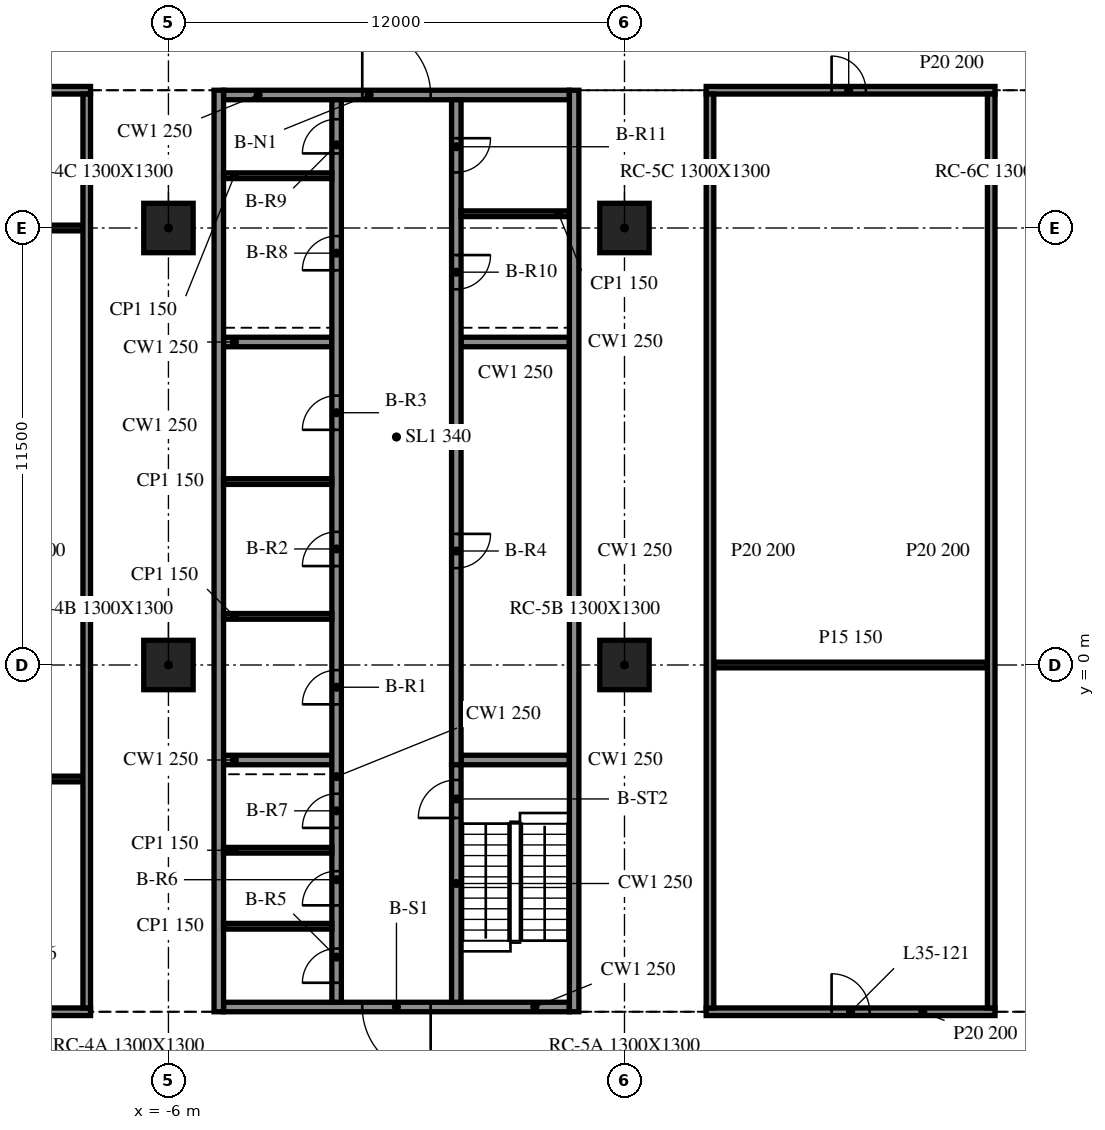
"""IFC4 building model, lengths in metres.
Left out: names, types, materials, properties, quantities, classifications, styles, units other than length and angle.
Written with IfcOpenShell. Run it as: python <this file> out.ifc"""

import sys

from ifc_helpers import new_model, si_unit, direction, frame, frame_2d, origin, origin_2d, place, context, subcontext, project, spatial, rectangle, extrude, element, fill, save


model = new_model("IFC4")
c1 = context("Model", 3, precision=1e-05, world=origin(), true_north=direction((0.0, 1.0)))
c2 = subcontext(c1, "Body", "Model", "MODEL_VIEW")
j1 = project(units=[si_unit("LENGTHUNIT", "METRE"), si_unit("PLANEANGLEUNIT", "RADIAN")], contexts=[c1])
p1 = place(None, origin())
s1 = spatial("IfcSite", under=j1, at=p1, CompositionType="ELEMENT")
p2 = place(p1, origin())
s2 = spatial("IfcBuilding", under=s1, at=p2, CompositionType="ELEMENT")
p3 = place(p2, frame((0.0, 0.0, 150.7)))
s3 = spatial("IfcBuildingStorey", under=s2, at=p3, CompositionType="ELEMENT", Elevation=150.7)
for number, where, z_axis, x_axis in (
    (1, (-6.0, 0.0, -0.34), (0.0, 0.0, 1.0), (1.0, 0.0, 0.0)),
    (2, (-6.0, 11.5, -0.34), (0.0, 0.0, 1.0), (1.0, 0.0, 0.0)),
    (3, (6.0, 0.0, -0.34), (0.0, 0.0, 1.0), (1.0, 0.0, 0.0)),
    (4, (6.0, 11.5, -0.34), (0.0, 0.0, 1.0), (1.0, 0.0, 0.0)),
):
    element("IfcColumn", number, at=place(p3, frame(where, z_axis=z_axis, x_axis=x_axis)), inside=s3, PredefinedType="COLUMN", context=c2, shape_type="SweptSolid", body=[
        extrude(rectangle(XDim=1.3, YDim=1.3, at=origin_2d()), origin(), (0.0, 0.0, 1.0), 3.89),
    ])
for number, where, z_axis, x_axis in (
    (5, (-4.675, 15.125, 0.0), (0.0, 0.0, 1.0), (0.0, -1.0, 0.0)),
    (6, (4.675, -9.125, 0.0), (0.0, 0.0, 1.0), (0.0, 1.0, 0.0)),
):
    element("IfcWall", number, at=place(p3, frame(where, z_axis=z_axis, x_axis=x_axis)), inside=s3, PredefinedType="SOLIDWALL", context=c2, shape_type="SweptSolid", body=[
        extrude(rectangle(XDim=24.25, YDim=0.25, at=frame_2d((12.125, 0.0))), origin(), (0.0, 0.0, 1.0), 3.55),
    ])
p4 = place(p3, frame((4.55, -9.0, 0.0), z_axis=(0.0, 0.0, 1.0), x_axis=(-1.0, 0.0, 0.0)))
e7 = element("IfcWall", 7, at=p4, inside=s3, PredefinedType="SOLIDWALL", context=c2, shape_type="SweptSolid", body=[
    extrude(rectangle(XDim=9.1, YDim=0.25, at=frame_2d((4.55, 0.0))), origin(), (0.0, 0.0, 1.0), 3.55),
])
p5 = place(p4, frame((3.65, 0.0, 0.0)))
e8 = element("IfcOpeningElement", 8, at=p5, cuts=e7, PredefinedType="OPENING", context=c2, shape_type="SweptSolid", body=[
    extrude(rectangle(XDim=1.8, YDim=2.1, at=frame_2d((0.9, 1.05))), frame((0.0, 0.135, 0.0), z_axis=(0.0, -1.0, 0.0), x_axis=(1.0, 0.0, 0.0)), (0.0, 0.0, 1.0), 0.27),
])
p6 = place(p3, frame((-4.55, 15.0, 0.0), z_axis=(0.0, 0.0, 1.0), x_axis=(1.0, 0.0, 0.0)))
e9 = element("IfcWall", 9, at=p6, inside=s3, PredefinedType="SOLIDWALL", context=c2, shape_type="SweptSolid", body=[
    extrude(rectangle(XDim=9.1, YDim=0.25, at=frame_2d((4.55, 0.0))), origin(), (0.0, 0.0, 1.0), 3.55),
])
p7 = place(p6, frame((3.65, 0.0, 0.0)))
e10 = element("IfcOpeningElement", 10, at=p7, cuts=e9, PredefinedType="OPENING", context=c2, shape_type="SweptSolid", body=[
    extrude(rectangle(XDim=1.8, YDim=2.1, at=frame_2d((0.9, 1.05))), frame((0.0, 0.135, 0.0), z_axis=(0.0, -1.0, 0.0), x_axis=(1.0, 0.0, 0.0)), (0.0, 0.0, 1.0), 0.27),
])
p8 = place(p3, frame((-1.575, -8.875, 0.0), z_axis=(0.0, 0.0, 1.0), x_axis=(0.0, 1.0, 0.0)))
e11 = element("IfcWall", 11, at=p8, inside=s3, PredefinedType="SOLIDWALL", context=c2, shape_type="SweptSolid", body=[
    extrude(rectangle(XDim=23.75, YDim=0.25, at=frame_2d((11.875, 0.0))), origin(), (0.0, 0.0, 1.0), 3.55),
])
p9 = place(p8, frame((7.84, 0.0, 0.0)))
e12 = element("IfcOpeningElement", 12, at=p9, cuts=e11, PredefinedType="OPENING", context=c2, shape_type="SweptSolid", body=[
    extrude(rectangle(XDim=0.9, YDim=2.1, at=frame_2d((0.45, 1.05))), frame((0.0, 0.135, 0.0), z_axis=(0.0, -1.0, 0.0), x_axis=(1.0, 0.0, 0.0)), (0.0, 0.0, 1.0), 0.27),
])
p10 = place(p8, frame((11.479, 0.0, 0.0)))
e13 = element("IfcOpeningElement", 13, at=p10, cuts=e11, PredefinedType="OPENING", context=c2, shape_type="SweptSolid", body=[
    extrude(rectangle(XDim=0.9, YDim=2.1, at=frame_2d((0.45, 1.05))), frame((0.0, 0.135, 0.0), z_axis=(0.0, -1.0, 0.0), x_axis=(1.0, 0.0, 0.0)), (0.0, 0.0, 1.0), 0.27),
])
p11 = place(p8, frame((15.064, 0.0, 0.0)))
e14 = element("IfcOpeningElement", 14, at=p11, cuts=e11, PredefinedType="OPENING", context=c2, shape_type="SweptSolid", body=[
    extrude(rectangle(XDim=0.9, YDim=2.1, at=frame_2d((0.45, 1.05))), frame((0.0, 0.135, 0.0), z_axis=(0.0, -1.0, 0.0), x_axis=(1.0, 0.0, 0.0)), (0.0, 0.0, 1.0), 0.27),
])
p12 = place(p8, frame((0.512, 0.0, 0.0)))
e15 = element("IfcOpeningElement", 15, at=p12, cuts=e11, PredefinedType="OPENING", context=c2, shape_type="SweptSolid", body=[
    extrude(rectangle(XDim=0.9, YDim=2.1, at=frame_2d((0.45, 1.05))), frame((0.0, 0.135, 0.0), z_axis=(0.0, -1.0, 0.0), x_axis=(1.0, 0.0, 0.0)), (0.0, 0.0, 1.0), 0.27),
])
p13 = place(p8, frame((2.55, 0.0, 0.0)))
e16 = element("IfcOpeningElement", 16, at=p13, cuts=e11, PredefinedType="OPENING", context=c2, shape_type="SweptSolid", body=[
    extrude(rectangle(XDim=0.9, YDim=2.1, at=frame_2d((0.45, 1.05))), frame((0.0, 0.135, 0.0), z_axis=(0.0, -1.0, 0.0), x_axis=(1.0, 0.0, 0.0)), (0.0, 0.0, 1.0), 0.27),
])
p14 = place(p8, frame((4.587, 0.0, 0.0)))
e17 = element("IfcOpeningElement", 17, at=p14, cuts=e11, PredefinedType="OPENING", context=c2, shape_type="SweptSolid", body=[
    extrude(rectangle(XDim=0.9, YDim=2.1, at=frame_2d((0.45, 1.05))), frame((0.0, 0.135, 0.0), z_axis=(0.0, -1.0, 0.0), x_axis=(1.0, 0.0, 0.0)), (0.0, 0.0, 1.0), 0.27),
])
p15 = place(p8, frame((19.262, 0.0, 0.0)))
e18 = element("IfcOpeningElement", 18, at=p15, cuts=e11, PredefinedType="OPENING", context=c2, shape_type="SweptSolid", body=[
    extrude(rectangle(XDim=0.9, YDim=2.1, at=frame_2d((0.45, 1.05))), frame((0.0, 0.135, 0.0), z_axis=(0.0, -1.0, 0.0), x_axis=(1.0, 0.0, 0.0)), (0.0, 0.0, 1.0), 0.27),
])
p16 = place(p8, frame((22.337, 0.0, 0.0)))
e19 = element("IfcOpeningElement", 19, at=p16, cuts=e11, PredefinedType="OPENING", context=c2, shape_type="SweptSolid", body=[
    extrude(rectangle(XDim=0.9, YDim=2.1, at=frame_2d((0.45, 1.05))), frame((0.0, 0.135, 0.0), z_axis=(0.0, -1.0, 0.0), x_axis=(1.0, 0.0, 0.0)), (0.0, 0.0, 1.0), 0.27),
])
p17 = place(p3, frame((1.575, -8.875, 0.0), z_axis=(0.0, 0.0, 1.0), x_axis=(0.0, 1.0, 0.0)))
e20 = element("IfcWall", 20, at=p17, inside=s3, PredefinedType="SOLIDWALL", context=c2, shape_type="SweptSolid", body=[
    extrude(rectangle(XDim=6.25, YDim=0.25, at=frame_2d((3.125, 0.0))), origin(), (0.0, 0.0, 1.0), 3.55),
])
p18 = place(p17, frame((4.85, 0.0, 0.0)))
e21 = element("IfcOpeningElement", 21, at=p18, cuts=e20, PredefinedType="OPENING", context=c2, shape_type="SweptSolid", body=[
    extrude(rectangle(XDim=1.0, YDim=2.1, at=frame_2d((0.5, 1.05))), frame((0.0, 0.135, 0.0), z_axis=(0.0, -1.0, 0.0), x_axis=(1.0, 0.0, 0.0)), (0.0, 0.0, 1.0), 0.27),
])
p19 = place(p3, frame((1.575, 14.875, 0.0), z_axis=(0.0, 0.0, 1.0), x_axis=(0.0, -1.0, 0.0)))
e22 = element("IfcWall", 22, at=p19, inside=s3, PredefinedType="SOLIDWALL", context=c2, shape_type="SweptSolid", body=[
    extrude(rectangle(XDim=17.5, YDim=0.25, at=frame_2d((8.75, 0.0))), origin(), (0.0, 0.0, 1.0), 3.55),
])
p20 = place(p19, frame((11.425, 0.0, 0.0)))
e23 = element("IfcOpeningElement", 23, at=p20, cuts=e22, PredefinedType="OPENING", context=c2, shape_type="SweptSolid", body=[
    extrude(rectangle(XDim=0.9, YDim=2.1, at=frame_2d((0.45, 1.05))), frame((0.0, 0.135, 0.0), z_axis=(0.0, -1.0, 0.0), x_axis=(1.0, 0.0, 0.0)), (0.0, 0.0, 1.0), 0.27),
])
p21 = place(p19, frame((4.087, 0.0, 0.0)))
e24 = element("IfcOpeningElement", 24, at=p21, cuts=e22, PredefinedType="OPENING", context=c2, shape_type="SweptSolid", body=[
    extrude(rectangle(XDim=0.9, YDim=2.1, at=frame_2d((0.45, 1.05))), frame((0.0, 0.135, 0.0), z_axis=(0.0, -1.0, 0.0), x_axis=(1.0, 0.0, 0.0)), (0.0, 0.0, 1.0), 0.27),
])
p22 = place(p19, frame((1.012, 0.0, 0.0)))
e25 = element("IfcOpeningElement", 25, at=p22, cuts=e22, PredefinedType="OPENING", context=c2, shape_type="SweptSolid", body=[
    extrude(rectangle(XDim=0.9, YDim=2.1, at=frame_2d((0.45, 1.05))), frame((0.0, 0.135, 0.0), z_axis=(0.0, -1.0, 0.0), x_axis=(1.0, 0.0, 0.0)), (0.0, 0.0, 1.0), 0.27),
])
for number, where, z_axis, x_axis in (
    (26, (-4.55, -2.5, 0.0), (0.0, 0.0, 1.0), (1.0, 0.0, 0.0)),
    (27, (-4.55, 8.5, 0.0), (0.0, 0.0, 1.0), (1.0, 0.0, 0.0)),
    (28, (1.7, -2.5, 0.0), (0.0, 0.0, 1.0), (1.0, 0.0, 0.0)),
    (29, (1.7, 8.5, 0.0), (0.0, 0.0, 1.0), (1.0, 0.0, 0.0)),
):
    element("IfcWall", number, at=place(p3, frame(where, z_axis=z_axis, x_axis=x_axis)), inside=s3, PredefinedType="SOLIDWALL", context=c2, shape_type="SweptSolid", body=[
        extrude(rectangle(XDim=2.85, YDim=0.25, at=frame_2d((1.425, 0.0))), origin(), (0.0, 0.0, 1.0), 3.55),
    ])
for number, where, z_axis, x_axis in (
    (30, (-4.55, 1.28, 0.0), (0.0, 0.0, 1.0), (1.0, 0.0, 0.0)),
    (31, (-4.55, 4.827, 0.0), (0.0, 0.0, 1.0), (1.0, 0.0, 0.0)),
    (32, (-4.55, -6.875, 0.0), (0.0, 0.0, 1.0), (1.0, 0.0, 0.0)),
    (33, (-4.55, -4.875, 0.0), (0.0, 0.0, 1.0), (1.0, 0.0, 0.0)),
    (34, (-4.55, 12.875, 0.0), (0.0, 0.0, 1.0), (1.0, 0.0, 0.0)),
    (35, (1.7, 11.875, 0.0), (0.0, 0.0, 1.0), (1.0, 0.0, 0.0)),
):
    element("IfcWall", number, at=place(p3, frame(where, z_axis=z_axis, x_axis=x_axis)), inside=s3, PredefinedType="PARTITIONING", context=c2, shape_type="SweptSolid", body=[
        extrude(rectangle(XDim=2.85, YDim=0.15, at=frame_2d((1.425, 0.0))), origin(), (0.0, 0.0, 1.0), 3.55),
    ])
p23 = place(p3, frame((-16.05, -9.125, 0.0), z_axis=(0.0, 0.0, 1.0), x_axis=(1.0, 0.0, 0.0)))
e36 = element("IfcWall", 36, at=p23, inside=s3, PredefinedType="PARTITIONING", context=c2, shape_type="SweptSolid", body=[
    extrude(rectangle(XDim=8.0, YDim=0.2, at=frame_2d((4.0, 0.0))), origin(), (0.0, 0.0, 1.0), 3.55),
])
p24 = place(p23, frame((3.5, 0.0, 0.0)))
e37 = element("IfcOpeningElement", 37, at=p24, cuts=e36, PredefinedType="OPENING", context=c2, shape_type="SweptSolid", body=[
    extrude(rectangle(XDim=1.0, YDim=2.1, at=frame_2d((0.5, 1.05))), frame((0.0, 0.11, 0.0), z_axis=(0.0, -1.0, 0.0), x_axis=(1.0, 0.0, 0.0)), (0.0, 0.0, 1.0), 0.22),
])
p25 = place(p3, frame((8.15, -9.125, 0.0), z_axis=(0.0, 0.0, 1.0), x_axis=(1.0, 0.0, 0.0)))
e38 = element("IfcWall", 38, at=p25, inside=s3, PredefinedType="PARTITIONING", context=c2, shape_type="SweptSolid", body=[
    extrude(rectangle(XDim=7.6, YDim=0.2, at=frame_2d((3.8, 0.0))), origin(), (0.0, 0.0, 1.0), 3.55),
])
p26 = place(p25, frame((3.3, 0.0, 0.0)))
e39 = element("IfcOpeningElement", 39, at=p26, cuts=e38, PredefinedType="OPENING", context=c2, shape_type="SweptSolid", body=[
    extrude(rectangle(XDim=1.0, YDim=2.1, at=frame_2d((0.5, 1.05))), frame((0.0, 0.11, 0.0), z_axis=(0.0, -1.0, 0.0), x_axis=(1.0, 0.0, 0.0)), (0.0, 0.0, 1.0), 0.22),
])
p27 = place(p3, frame((-15.85, -3.0, 0.0), z_axis=(0.0, 0.0, 1.0), x_axis=(1.0, 0.0, 0.0)))
e40 = element("IfcWall", 40, at=p27, inside=s3, PredefinedType="PARTITIONING", context=c2, shape_type="SweptSolid", body=[
    extrude(rectangle(XDim=7.6, YDim=0.15, at=frame_2d((3.8, 0.0))), origin(), (0.0, 0.0, 1.0), 3.55),
])
p28 = place(p3, frame((8.35, 0.0, 0.0), z_axis=(0.0, 0.0, 1.0), x_axis=(1.0, 0.0, 0.0)))
e41 = element("IfcWall", 41, at=p28, inside=s3, PredefinedType="PARTITIONING", context=c2, shape_type="SweptSolid", body=[
    extrude(rectangle(XDim=7.2, YDim=0.15, at=frame_2d((3.6, 0.0))), origin(), (0.0, 0.0, 1.0), 3.55),
])
p29 = place(p3, frame((-15.85, 11.5, 0.0), z_axis=(0.0, 0.0, 1.0), x_axis=(1.0, 0.0, 0.0)))
e42 = element("IfcWall", 42, at=p29, inside=s3, PredefinedType="PARTITIONING", context=c2, shape_type="SweptSolid", body=[
    extrude(rectangle(XDim=7.6, YDim=0.15, at=frame_2d((3.8, 0.0))), origin(), (0.0, 0.0, 1.0), 3.55),
])
p30 = place(p3, frame((-16.05, 15.125, 0.0), z_axis=(0.0, 0.0, 1.0), x_axis=(1.0, 0.0, 0.0)))
e43 = element("IfcWall", 43, at=p30, inside=s3, PredefinedType="PARTITIONING", context=c2, shape_type="SweptSolid", body=[
    extrude(rectangle(XDim=8.0, YDim=0.2, at=frame_2d((4.0, 0.0))), origin(), (0.0, 0.0, 1.0), 3.55),
])
p31 = place(p30, frame((3.5, 0.0, 0.0)))
e44 = element("IfcOpeningElement", 44, at=p31, cuts=e43, PredefinedType="OPENING", context=c2, shape_type="SweptSolid", body=[
    extrude(rectangle(XDim=1.0, YDim=2.1, at=frame_2d((0.5, 1.05))), frame((0.0, 0.11, 0.0), z_axis=(0.0, -1.0, 0.0), x_axis=(1.0, 0.0, 0.0)), (0.0, 0.0, 1.0), 0.22),
])
p32 = place(p3, frame((8.15, 15.125, 0.0), z_axis=(0.0, 0.0, 1.0), x_axis=(1.0, 0.0, 0.0)))
e45 = element("IfcWall", 45, at=p32, inside=s3, PredefinedType="PARTITIONING", context=c2, shape_type="SweptSolid", body=[
    extrude(rectangle(XDim=7.6, YDim=0.2, at=frame_2d((3.8, 0.0))), origin(), (0.0, 0.0, 1.0), 3.55),
])
p33 = place(p32, frame((3.3, 0.0, 0.0)))
e46 = element("IfcOpeningElement", 46, at=p33, cuts=e45, PredefinedType="OPENING", context=c2, shape_type="SweptSolid", body=[
    extrude(rectangle(XDim=0.9, YDim=2.1, at=frame_2d((0.45, 1.05))), frame((0.0, 0.11, 0.0), z_axis=(0.0, -1.0, 0.0), x_axis=(1.0, 0.0, 0.0)), (0.0, 0.0, 1.0), 0.22),
])
for number, where, z_axis, x_axis in (
    (47, (-8.15, -9.025, 0.0), (0.0, 0.0, 1.0), (0.0, 1.0, 0.0)),
    (48, (8.25, -9.025, 0.0), (0.0, 0.0, 1.0), (0.0, 1.0, 0.0)),
    (49, (15.65, -9.025, 0.0), (0.0, 0.0, 1.0), (0.0, 1.0, 0.0)),
):
    element("IfcWall", number, at=place(p3, frame(where, z_axis=z_axis, x_axis=x_axis)), inside=s3, PredefinedType="PARTITIONING", context=c2, shape_type="SweptSolid", body=[
        extrude(rectangle(XDim=24.05, YDim=0.2, at=frame_2d((12.025, 0.0))), origin(), (0.0, 0.0, 1.0), 3.55),
    ])
p34 = place(p5, origin())
e50 = element("IfcDoor", 50, at=p34, inside=s3, OperationType="DOUBLE_DOOR_SINGLE_SWING", PredefinedType="DOOR", context=c2, shape_type="SweptSolid", body=[
    extrude(rectangle(XDim=1.8, YDim=2.1, at=frame_2d((0.9, 1.05))), frame((0.0, 0.025, 0.0), z_axis=(0.0, -1.0, 0.0), x_axis=(1.0, 0.0, 0.0)), (0.0, 0.0, 1.0), 0.05),
])
fill(e8, e50)
p35 = place(p7, origin())
e51 = element("IfcDoor", 51, at=p35, inside=s3, OperationType="DOUBLE_DOOR_SINGLE_SWING", PredefinedType="DOOR", context=c2, shape_type="SweptSolid", body=[
    extrude(rectangle(XDim=1.8, YDim=2.1, at=frame_2d((0.9, 1.05))), frame((0.0, 0.025, 0.0), z_axis=(0.0, -1.0, 0.0), x_axis=(1.0, 0.0, 0.0)), (0.0, 0.0, 1.0), 0.05),
])
fill(e10, e51)
p36 = place(p9, origin())
e52 = element("IfcDoor", 52, at=p36, inside=s3, OperationType="SINGLE_SWING_LEFT", PredefinedType="DOOR", context=c2, shape_type="SweptSolid", body=[
    extrude(rectangle(XDim=0.9, YDim=2.1, at=frame_2d((0.45, 1.05))), frame((0.0, 0.025, 0.0), z_axis=(0.0, -1.0, 0.0), x_axis=(1.0, 0.0, 0.0)), (0.0, 0.0, 1.0), 0.05),
])
fill(e12, e52)
p37 = place(p10, origin())
e53 = element("IfcDoor", 53, at=p37, inside=s3, OperationType="SINGLE_SWING_RIGHT", PredefinedType="DOOR", context=c2, shape_type="SweptSolid", body=[
    extrude(rectangle(XDim=0.9, YDim=2.1, at=frame_2d((0.45, 1.05))), frame((0.0, 0.025, 0.0), z_axis=(0.0, -1.0, 0.0), x_axis=(1.0, 0.0, 0.0)), (0.0, 0.0, 1.0), 0.05),
])
fill(e13, e53)
p38 = place(p11, origin())
e54 = element("IfcDoor", 54, at=p38, inside=s3, OperationType="SINGLE_SWING_LEFT", PredefinedType="DOOR", context=c2, shape_type="SweptSolid", body=[
    extrude(rectangle(XDim=0.9, YDim=2.1, at=frame_2d((0.45, 1.05))), frame((0.0, 0.025, 0.0), z_axis=(0.0, -1.0, 0.0), x_axis=(1.0, 0.0, 0.0)), (0.0, 0.0, 1.0), 0.05),
])
fill(e14, e54)
p39 = place(p20, origin())
e55 = element("IfcDoor", 55, at=p39, inside=s3, OperationType="SINGLE_SWING_RIGHT", PredefinedType="DOOR", context=c2, shape_type="SweptSolid", body=[
    extrude(rectangle(XDim=0.9, YDim=2.1, at=frame_2d((0.45, 1.05))), frame((0.0, 0.025, 0.0), z_axis=(0.0, -1.0, 0.0), x_axis=(1.0, 0.0, 0.0)), (0.0, 0.0, 1.0), 0.05),
])
fill(e23, e55)
p40 = place(p12, origin())
e56 = element("IfcDoor", 56, at=p40, inside=s3, OperationType="SINGLE_SWING_LEFT", PredefinedType="DOOR", context=c2, shape_type="SweptSolid", body=[
    extrude(rectangle(XDim=0.9, YDim=2.1, at=frame_2d((0.45, 1.05))), frame((0.0, 0.025, 0.0), z_axis=(0.0, -1.0, 0.0), x_axis=(1.0, 0.0, 0.0)), (0.0, 0.0, 1.0), 0.05),
])
fill(e15, e56)
p41 = place(p13, origin())
e57 = element("IfcDoor", 57, at=p41, inside=s3, OperationType="SINGLE_SWING_RIGHT", PredefinedType="DOOR", context=c2, shape_type="SweptSolid", body=[
    extrude(rectangle(XDim=0.9, YDim=2.1, at=frame_2d((0.45, 1.05))), frame((0.0, 0.025, 0.0), z_axis=(0.0, -1.0, 0.0), x_axis=(1.0, 0.0, 0.0)), (0.0, 0.0, 1.0), 0.05),
])
fill(e16, e57)
p42 = place(p14, origin())
e58 = element("IfcDoor", 58, at=p42, inside=s3, OperationType="SINGLE_SWING_LEFT", PredefinedType="DOOR", context=c2, shape_type="SweptSolid", body=[
    extrude(rectangle(XDim=0.9, YDim=2.1, at=frame_2d((0.45, 1.05))), frame((0.0, 0.025, 0.0), z_axis=(0.0, -1.0, 0.0), x_axis=(1.0, 0.0, 0.0)), (0.0, 0.0, 1.0), 0.05),
])
fill(e17, e58)
p43 = place(p15, origin())
e59 = element("IfcDoor", 59, at=p43, inside=s3, OperationType="SINGLE_SWING_RIGHT", PredefinedType="DOOR", context=c2, shape_type="SweptSolid", body=[
    extrude(rectangle(XDim=0.9, YDim=2.1, at=frame_2d((0.45, 1.05))), frame((0.0, 0.025, 0.0), z_axis=(0.0, -1.0, 0.0), x_axis=(1.0, 0.0, 0.0)), (0.0, 0.0, 1.0), 0.05),
])
fill(e18, e59)
p44 = place(p16, origin())
e60 = element("IfcDoor", 60, at=p44, inside=s3, OperationType="SINGLE_SWING_LEFT", PredefinedType="DOOR", context=c2, shape_type="SweptSolid", body=[
    extrude(rectangle(XDim=0.9, YDim=2.1, at=frame_2d((0.45, 1.05))), frame((0.0, 0.025, 0.0), z_axis=(0.0, -1.0, 0.0), x_axis=(1.0, 0.0, 0.0)), (0.0, 0.0, 1.0), 0.05),
])
fill(e19, e60)
p45 = place(p21, origin())
e61 = element("IfcDoor", 61, at=p45, inside=s3, OperationType="SINGLE_SWING_RIGHT", PredefinedType="DOOR", context=c2, shape_type="SweptSolid", body=[
    extrude(rectangle(XDim=0.9, YDim=2.1, at=frame_2d((0.45, 1.05))), frame((0.0, 0.025, 0.0), z_axis=(0.0, -1.0, 0.0), x_axis=(1.0, 0.0, 0.0)), (0.0, 0.0, 1.0), 0.05),
])
fill(e24, e61)
p46 = place(p22, origin())
e62 = element("IfcDoor", 62, at=p46, inside=s3, OperationType="SINGLE_SWING_LEFT", PredefinedType="DOOR", context=c2, shape_type="SweptSolid", body=[
    extrude(rectangle(XDim=0.9, YDim=2.1, at=frame_2d((0.45, 1.05))), frame((0.0, 0.025, 0.0), z_axis=(0.0, -1.0, 0.0), x_axis=(1.0, 0.0, 0.0)), (0.0, 0.0, 1.0), 0.05),
])
fill(e25, e62)
p47 = place(p18, origin())
e63 = element("IfcDoor", 63, at=p47, inside=s3, OperationType="SINGLE_SWING_RIGHT", PredefinedType="DOOR", context=c2, shape_type="SweptSolid", body=[
    extrude(rectangle(XDim=1.0, YDim=2.1, at=frame_2d((0.5, 1.05))), frame((0.0, 0.025, 0.0), z_axis=(0.0, -1.0, 0.0), x_axis=(1.0, 0.0, 0.0)), (0.0, 0.0, 1.0), 0.05),
])
fill(e21, e63)
p48 = place(p26, origin())
e64 = element("IfcDoor", 64, at=p48, inside=s3, OperationType="SINGLE_SWING_RIGHT", PredefinedType="DOOR", context=c2, shape_type="SweptSolid", body=[
    extrude(rectangle(XDim=1.0, YDim=2.1, at=frame_2d((0.5, 1.05))), frame((0.0, 0.025, 0.0), z_axis=(0.0, -1.0, 0.0), x_axis=(1.0, 0.0, 0.0)), (0.0, 0.0, 1.0), 0.05),
])
fill(e39, e64)
p49 = place(p33, origin())
e65 = element("IfcDoor", 65, at=p49, inside=s3, OperationType="SINGLE_SWING_RIGHT", PredefinedType="DOOR", context=c2, shape_type="SweptSolid", body=[
    extrude(rectangle(XDim=0.9, YDim=2.1, at=frame_2d((0.45, 1.05))), frame((0.0, 0.025, 0.0), z_axis=(0.0, -1.0, 0.0), x_axis=(1.0, 0.0, 0.0)), (0.0, 0.0, 1.0), 0.05),
])
fill(e46, e65)
save(model, sys.argv[1])
